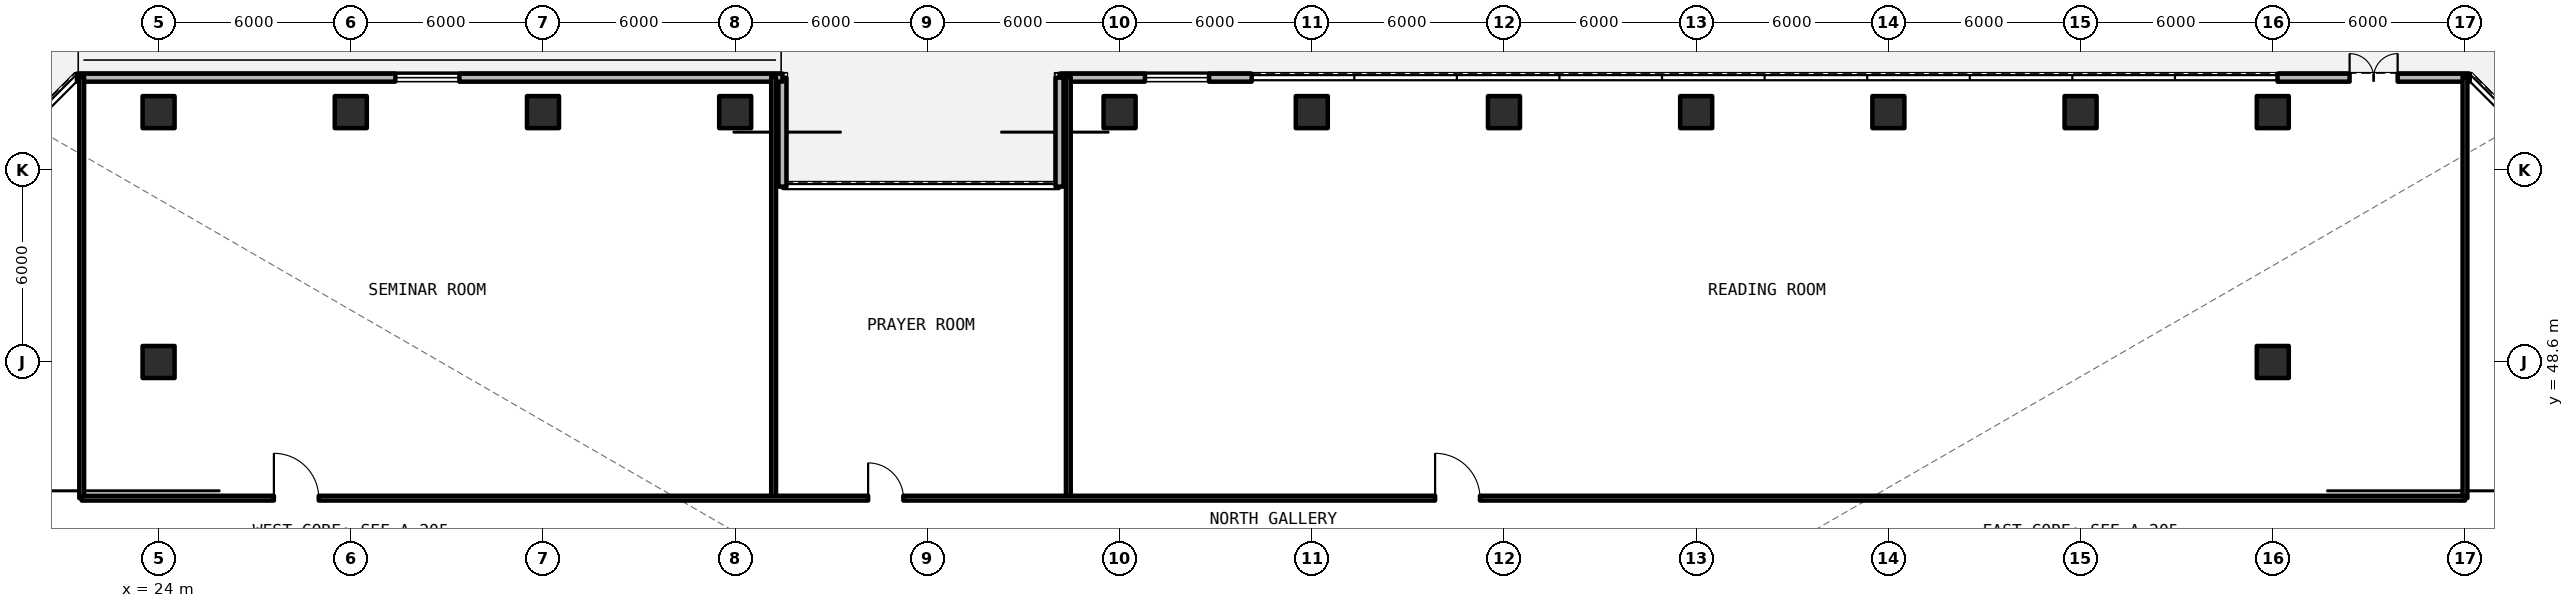
"""IFC4 building model, lengths in metres.
Left out: names, types, materials, properties, quantities, classifications, styles, units other than length and angle.
Written with IfcOpenShell. Run it as: python <this file> out.ifc"""

import sys

from ifc_helpers import new_model, si_unit, direction, frame, frame_2d, origin, origin_2d, place, context, subcontext, project, spatial, rectangle, extrude, element, fill, save


model = new_model("IFC4")
c1 = context("Model", 3, precision=1e-05, world=origin(), true_north=direction((0.0, 1.0)))
c2 = subcontext(c1, "Body", "Model", "MODEL_VIEW")
j1 = project(units=[si_unit("LENGTHUNIT", "METRE"), si_unit("PLANEANGLEUNIT", "RADIAN")], contexts=[c1])
p1 = place(None, origin())
s1 = spatial("IfcSite", under=j1, at=p1, CompositionType="ELEMENT")
p2 = place(p1, origin())
s2 = spatial("IfcBuilding", under=s1, at=p2, CompositionType="ELEMENT")
p3 = place(p2, frame((0.0, 0.0, 78.21)))
s3 = spatial("IfcBuildingStorey", under=s2, at=p3, CompositionType="ELEMENT", Elevation=78.21)
for number, where, z_axis, x_axis in (
    (1, (24.0, 48.6, 0.0), (0.0, 0.0, 1.0), (1.0, 0.0, 0.0)),
    (2, (90.0, 48.6, 0.0), (0.0, 0.0, 1.0), (1.0, 0.0, 0.0)),
):
    element("IfcColumn", number, at=place(p3, frame(where, z_axis=z_axis, x_axis=x_axis)), inside=s3, PredefinedType="COLUMN", context=c2, shape_type="SweptSolid", body=[
        extrude(rectangle(XDim=1.0, YDim=1.0, at=origin_2d()), origin(), (0.0, 0.0, 1.0), 3.96),
    ])
for number, where, z_axis, x_axis in (
    (3, (24.0, 56.4, -0.28), (0.0, 0.0, 1.0), (1.0, 0.0, 0.0)),
    (4, (30.0, 56.4, -0.28), (0.0, 0.0, 1.0), (1.0, 0.0, 0.0)),
    (5, (36.0, 56.4, -0.28), (0.0, 0.0, 1.0), (1.0, 0.0, 0.0)),
    (6, (42.0, 56.4, -0.28), (0.0, 0.0, 1.0), (1.0, 0.0, 0.0)),
    (7, (54.0, 56.4, -0.28), (0.0, 0.0, 1.0), (1.0, 0.0, 0.0)),
    (8, (60.0, 56.4, -0.28), (0.0, 0.0, 1.0), (1.0, 0.0, 0.0)),
    (9, (66.0, 56.4, -0.28), (0.0, 0.0, 1.0), (1.0, 0.0, 0.0)),
    (10, (72.0, 56.4, -0.28), (0.0, 0.0, 1.0), (1.0, 0.0, 0.0)),
    (11, (78.0, 56.4, -0.28), (0.0, 0.0, 1.0), (1.0, 0.0, 0.0)),
    (12, (84.0, 56.4, -0.28), (0.0, 0.0, 1.0), (1.0, 0.0, 0.0)),
    (13, (90.0, 56.4, -0.28), (0.0, 0.0, 1.0), (1.0, 0.0, 0.0)),
):
    element("IfcColumn", number, at=place(p3, frame(where, z_axis=z_axis, x_axis=x_axis)), inside=s3, PredefinedType="COLUMN", context=c2, shape_type="SweptSolid", body=[
        extrude(rectangle(XDim=1.0, YDim=1.0, at=origin_2d()), origin(), (0.0, 0.0, 1.0), 4.24),
    ])
p4 = place(p3, frame((96.148, 57.475, 0.0), z_axis=(0.0, 0.0, 1.0), x_axis=(-1.0, 0.0, 0.0)))
e14 = element("IfcWall", 14, at=p4, inside=s3, PredefinedType="SOLIDWALL", context=c2, shape_type="SweptSolid", body=[
    extrude(rectangle(XDim=6.0, YDim=0.25, at=frame_2d((3.0, 0.0))), origin(), (0.0, 0.0, 1.0), 3.74),
])
p5 = place(p4, frame((2.25, 0.0, 0.0)))
e15 = element("IfcOpeningElement", 15, at=p5, cuts=e14, PredefinedType="OPENING", context=c2, shape_type="SweptSolid", body=[
    extrude(rectangle(XDim=1.5, YDim=2.2, at=frame_2d((0.75, 1.1))), frame((0.0, 0.135, 0.0), z_axis=(0.0, -1.0, 0.0), x_axis=(1.0, 0.0, 0.0)), (0.0, 0.0, 1.0), 0.27),
])
p6 = place(p3, frame((58.125, 57.475, 0.0), z_axis=(0.0, 0.0, 1.0), x_axis=(-1.0, 0.0, 0.0)))
e16 = element("IfcWall", 16, at=p6, inside=s3, PredefinedType="SOLIDWALL", context=c2, shape_type="SweptSolid", body=[
    extrude(rectangle(XDim=6.0, YDim=0.25, at=frame_2d((3.0, 0.0))), origin(), (0.0, 0.0, 1.0), 3.74),
])
p7 = place(p6, frame((1.333, 0.0, 0.78)))
e17 = element("IfcOpeningElement", 17, at=p7, cuts=e16, PredefinedType="OPENING", context=c2, shape_type="SweptSolid", body=[
    extrude(rectangle(XDim=2.0, YDim=1.66, at=frame_2d((1.0, 0.83))), frame((0.0, 0.135, 0.0), z_axis=(0.0, -1.0, 0.0), x_axis=(1.0, 0.0, 0.0)), (0.0, 0.0, 1.0), 0.27),
])
for number, where, z_axis, x_axis in (
    (18, (52.125, 57.475, 0.0), (0.0, 0.0, 1.0), (0.0, -1.0, 0.0)),
    (19, (43.475, 54.075, 0.0), (0.0, 0.0, 1.0), (0.0, 1.0, 0.0)),
):
    element("IfcWall", number, at=place(p3, frame(where, z_axis=z_axis, x_axis=x_axis)), inside=s3, PredefinedType="SOLIDWALL", context=c2, shape_type="SweptSolid", body=[
        extrude(rectangle(XDim=3.4, YDim=0.25, at=frame_2d((1.7, 0.0))), origin(), (0.0, 0.0, 1.0), 3.74),
    ])
p8 = place(p3, frame((43.475, 57.475, 0.0), z_axis=(0.0, 0.0, 1.0), x_axis=(-1.0, 0.0, 0.0)))
e20 = element("IfcWall", 20, at=p8, inside=s3, PredefinedType="SOLIDWALL", context=c2, shape_type="SweptSolid", body=[
    extrude(rectangle(XDim=22.023, YDim=0.25, at=frame_2d((11.012, 0.0))), origin(), (0.0, 0.0, 1.0), 3.74),
])
p9 = place(p8, frame((10.085, 0.0, 0.78)))
e21 = element("IfcOpeningElement", 21, at=p9, cuts=e20, PredefinedType="OPENING", context=c2, shape_type="SweptSolid", body=[
    extrude(rectangle(XDim=2.0, YDim=1.66, at=frame_2d((1.0, 0.83))), frame((0.0, 0.135, 0.0), z_axis=(0.0, -1.0, 0.0), x_axis=(1.0, 0.0, 0.0)), (0.0, 0.0, 1.0), 0.27),
])
p10 = place(p3, frame((21.6, 44.35, 0.0), z_axis=(0.0, 0.0, 1.0), x_axis=(0.0, 1.0, 0.0)))
e22 = element("IfcWall", 22, at=p10, inside=s3, PredefinedType="SOLIDWALL", context=c2, shape_type="SweptSolid", body=[
    extrude(rectangle(XDim=13.15, YDim=0.15, at=frame_2d((6.575, 0.0))), origin(), (0.0, 0.0, 1.0), 2.96),
])
for number, where, z_axis, x_axis in (
    (23, (43.2, 44.35, 0.0), (0.0, 0.0, 1.0), (0.0, 1.0, 0.0)),
    (24, (52.4, 44.35, 0.0), (0.0, 0.0, 1.0), (0.0, 1.0, 0.0)),
):
    element("IfcWall", number, at=place(p3, frame(where, z_axis=z_axis, x_axis=x_axis)), inside=s3, PredefinedType="PARTITIONING", context=c2, shape_type="SweptSolid", body=[
        extrude(rectangle(XDim=13.15, YDim=0.15, at=frame_2d((6.575, 0.0))), origin(), (0.0, 0.0, 1.0), 2.96),
    ])
p11 = place(p3, frame((96.0, 44.35, 0.0), z_axis=(0.0, 0.0, 1.0), x_axis=(0.0, 1.0, 0.0)))
e25 = element("IfcWall", 25, at=p11, inside=s3, PredefinedType="SOLIDWALL", context=c2, shape_type="SweptSolid", body=[
    extrude(rectangle(XDim=13.15, YDim=0.15, at=frame_2d((6.575, 0.0))), origin(), (0.0, 0.0, 1.0), 2.96),
])
p12 = place(p3, frame((21.6, 44.35, 0.0), z_axis=(0.0, 0.0, 1.0), x_axis=(1.0, 0.0, 0.0)))
e26 = element("IfcWall", 26, at=p12, inside=s3, PredefinedType="SOLIDWALL", context=c2, shape_type="SweptSolid", body=[
    extrude(rectangle(XDim=74.4, YDim=0.15, at=frame_2d((37.2, 0.0))), origin(), (0.0, 0.0, 1.0), 2.96),
])
p13 = place(p12, frame((6.0, 0.0, 0.0)))
e27 = element("IfcOpeningElement", 27, at=p13, cuts=e26, PredefinedType="OPENING", context=c2, shape_type="SweptSolid", body=[
    extrude(rectangle(XDim=1.4, YDim=2.15, at=frame_2d((0.7, 1.075))), frame((0.0, 0.085, 0.0), z_axis=(0.0, -1.0, 0.0), x_axis=(1.0, 0.0, 0.0)), (0.0, 0.0, 1.0), 0.17),
])
p14 = place(p12, frame((24.55, 0.0, 0.0)))
e28 = element("IfcOpeningElement", 28, at=p14, cuts=e26, PredefinedType="OPENING", context=c2, shape_type="SweptSolid", body=[
    extrude(rectangle(XDim=1.1, YDim=2.15, at=frame_2d((0.55, 1.075))), frame((0.0, 0.085, 0.0), z_axis=(0.0, -1.0, 0.0), x_axis=(1.0, 0.0, 0.0)), (0.0, 0.0, 1.0), 0.17),
])
p15 = place(p12, frame((42.25, 0.0, 0.0)))
e29 = element("IfcOpeningElement", 29, at=p15, cuts=e26, PredefinedType="OPENING", context=c2, shape_type="SweptSolid", body=[
    extrude(rectangle(XDim=1.4, YDim=2.15, at=frame_2d((0.7, 1.075))), frame((0.0, 0.085, 0.0), z_axis=(0.0, -1.0, 0.0), x_axis=(1.0, 0.0, 0.0)), (0.0, 0.0, 1.0), 0.17),
])
p16 = place(p5, frame((1.5, 0.0, 0.0), z_axis=(0.0, 0.0, 1.0), x_axis=(-1.0, 0.0, 0.0)))
e30 = element("IfcDoor", 30, at=p16, inside=s3, OperationType="SINGLE_SWING_LEFT", PredefinedType="DOOR", context=c2, shape_type="SweptSolid", body=[
    extrude(rectangle(XDim=1.5, YDim=2.2, at=frame_2d((0.75, 1.1))), frame((0.0, 0.025, 0.0), z_axis=(0.0, -1.0, 0.0), x_axis=(1.0, 0.0, 0.0)), (0.0, 0.0, 1.0), 0.05),
])
fill(e15, e30)
p17 = place(p7, origin())
e31 = element("IfcWindow", 31, at=p17, inside=s3, PartitioningType="SINGLE_PANEL", PredefinedType="WINDOW", context=c2, shape_type="SweptSolid", body=[
    extrude(rectangle(XDim=2.0, YDim=1.66, at=frame_2d((1.0, 0.83))), frame((0.0, 0.03, 0.0), z_axis=(0.0, -1.0, 0.0), x_axis=(1.0, 0.0, 0.0)), (0.0, 0.0, 1.0), 0.06),
])
fill(e17, e31)
p18 = place(p9, origin())
e32 = element("IfcWindow", 32, at=p18, inside=s3, PartitioningType="SINGLE_PANEL", PredefinedType="WINDOW", context=c2, shape_type="SweptSolid", body=[
    extrude(rectangle(XDim=2.0, YDim=1.66, at=frame_2d((1.0, 0.83))), frame((0.0, 0.03, 0.0), z_axis=(0.0, -1.0, 0.0), x_axis=(1.0, 0.0, 0.0)), (0.0, 0.0, 1.0), 0.06),
])
fill(e21, e32)
p19 = place(p13, origin())
e33 = element("IfcDoor", 33, at=p19, inside=s3, OperationType="SINGLE_SWING_RIGHT", PredefinedType="DOOR", context=c2, shape_type="SweptSolid", body=[
    extrude(rectangle(XDim=1.4, YDim=2.15, at=frame_2d((0.7, 1.075))), frame((0.0, 0.025, 0.0), z_axis=(0.0, -1.0, 0.0), x_axis=(1.0, 0.0, 0.0)), (0.0, 0.0, 1.0), 0.05),
])
fill(e27, e33)
p20 = place(p14, origin())
e34 = element("IfcDoor", 34, at=p20, inside=s3, OperationType="SINGLE_SWING_LEFT", PredefinedType="DOOR", context=c2, shape_type="SweptSolid", body=[
    extrude(rectangle(XDim=1.1, YDim=2.15, at=frame_2d((0.55, 1.075))), frame((0.0, 0.025, 0.0), z_axis=(0.0, -1.0, 0.0), x_axis=(1.0, 0.0, 0.0)), (0.0, 0.0, 1.0), 0.05),
])
fill(e28, e34)
p21 = place(p15, origin())
e35 = element("IfcDoor", 35, at=p21, inside=s3, OperationType="SINGLE_SWING_RIGHT", PredefinedType="DOOR", context=c2, shape_type="SweptSolid", body=[
    extrude(rectangle(XDim=1.4, YDim=2.15, at=frame_2d((0.7, 1.075))), frame((0.0, 0.025, 0.0), z_axis=(0.0, -1.0, 0.0), x_axis=(1.0, 0.0, 0.0)), (0.0, 0.0, 1.0), 0.05),
])
fill(e29, e35)
save(model, sys.argv[1])
